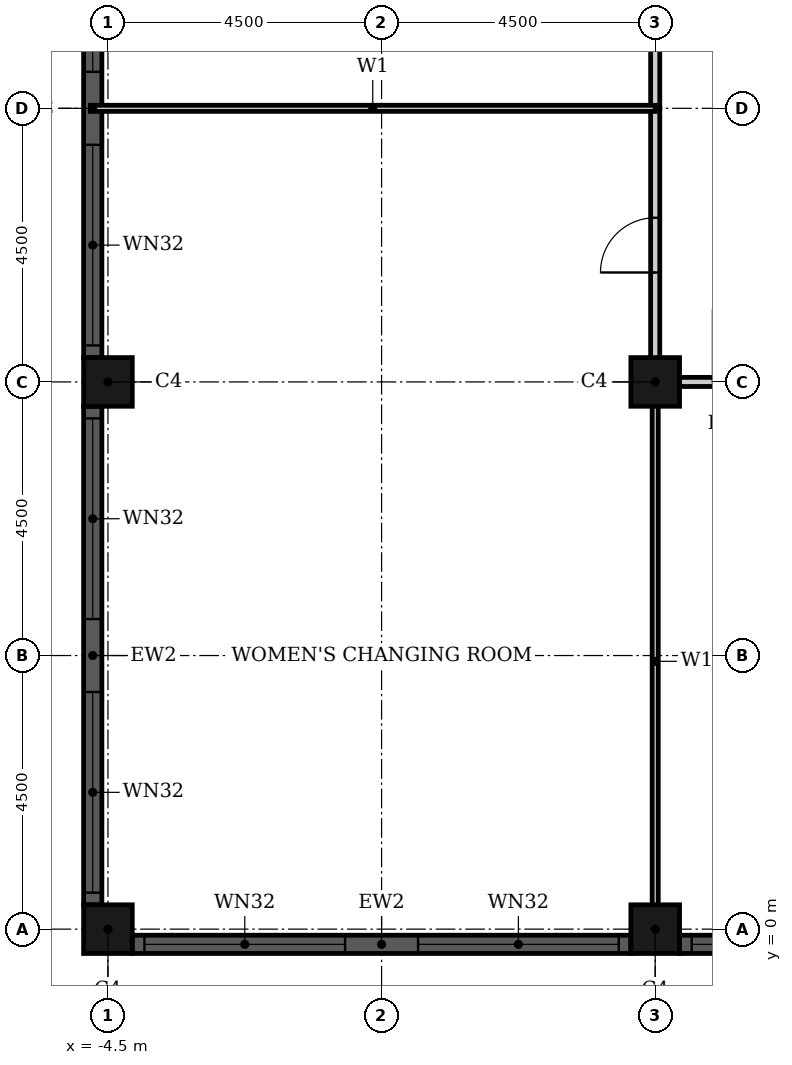
"""IFC4 building model, lengths in metres.
Left out: names, types, materials, properties, quantities, classifications, styles, units other than length and angle.
Written with IfcOpenShell. Run it as: python <this file> out.ifc"""

import sys

from ifc_helpers import new_model, si_unit, direction, frame, frame_2d, origin, origin_2d, place, context, subcontext, project, spatial, rectangle, hollow_rectangle, extrude, element, fill, save


model = new_model("IFC4")
c1 = context("Model", 3, precision=1e-05, world=origin(), true_north=direction((0.0, 1.0)))
c2 = subcontext(c1, "Body", "Model", "MODEL_VIEW")
j1 = project(units=[si_unit("LENGTHUNIT", "METRE"), si_unit("PLANEANGLEUNIT", "RADIAN")], contexts=[c1])
p1 = place(None, origin())
s1 = spatial("IfcSite", under=j1, at=p1, CompositionType="ELEMENT")
p2 = place(p1, origin())
s2 = spatial("IfcBuilding", under=s1, at=p2, CompositionType="ELEMENT")
p3 = place(p2, frame((0.0, 0.0, 24.0)))
s3 = spatial("IfcBuildingStorey", under=s2, at=p3, CompositionType="ELEMENT", Elevation=24.0)
for number, where, z_axis, x_axis in (
    (1, (-4.5, 0.0, 0.0), (0.0, 0.0, 1.0), (1.0, 0.0, 0.0)),
    (2, (-4.5, 9.0, 0.0), (0.0, 0.0, 1.0), (1.0, 0.0, 0.0)),
    (3, (4.5, 0.0, 0.0), (0.0, 0.0, 1.0), (1.0, 0.0, 0.0)),
    (4, (4.5, 9.0, 0.0), (0.0, 0.0, 1.0), (1.0, 0.0, 0.0)),
):
    element("IfcColumn", number, at=place(p3, frame(where, z_axis=z_axis, x_axis=x_axis)), inside=s3, PredefinedType="COLUMN", context=c2, shape_type="SweptSolid", body=[
        extrude(hollow_rectangle(XDim=0.8, YDim=0.8, WallThickness=0.025, at=origin_2d()), origin(), (0.0, 0.0, 1.0), 4.8),
    ])
p4 = place(p3, frame((-4.75, 17.6, 0.0), z_axis=(0.0, 0.0, 1.0), x_axis=(0.0, -1.0, 0.0)))
e5 = element("IfcWall", 5, at=p4, inside=s3, PredefinedType="SOLIDWALL", context=c2, shape_type="SweptSolid", body=[
    extrude(rectangle(XDim=8.2, YDim=0.3, at=frame_2d((4.1, 0.0))), origin(), (0.0, 0.0, 1.0), 4.8),
])
p5 = place(p4, frame((0.2, 0.0, 0.9)))
e6 = element("IfcOpeningElement", 6, at=p5, cuts=e5, PredefinedType="OPENING", context=c2, shape_type="SweptSolid", body=[
    extrude(rectangle(XDim=3.3, YDim=2.9, at=frame_2d((1.65, 1.45))), frame((0.0, 0.16, 0.0), z_axis=(0.0, -1.0, 0.0), x_axis=(1.0, 0.0, 0.0)), (0.0, 0.0, 1.0), 0.32),
])
p6 = place(p4, frame((4.7, 0.0, 0.9)))
e7 = element("IfcOpeningElement", 7, at=p6, cuts=e5, PredefinedType="OPENING", context=c2, shape_type="SweptSolid", body=[
    extrude(rectangle(XDim=3.3, YDim=2.9, at=frame_2d((1.65, 1.45))), frame((0.0, 0.16, 0.0), z_axis=(0.0, -1.0, 0.0), x_axis=(1.0, 0.0, 0.0)), (0.0, 0.0, 1.0), 0.32),
])
p7 = place(p3, frame((-4.75, 8.6, 0.0), z_axis=(0.0, 0.0, 1.0), x_axis=(0.0, -1.0, 0.0)))
e8 = element("IfcWall", 8, at=p7, inside=s3, PredefinedType="SOLIDWALL", context=c2, shape_type="SweptSolid", body=[
    extrude(rectangle(XDim=8.2, YDim=0.3, at=frame_2d((4.1, 0.0))), origin(), (0.0, 0.0, 1.0), 4.8),
])
p8 = place(p7, frame((0.2, 0.0, 0.9)))
e9 = element("IfcOpeningElement", 9, at=p8, cuts=e8, PredefinedType="OPENING", context=c2, shape_type="SweptSolid", body=[
    extrude(rectangle(XDim=3.3, YDim=2.9, at=frame_2d((1.65, 1.45))), frame((0.0, 0.16, 0.0), z_axis=(0.0, -1.0, 0.0), x_axis=(1.0, 0.0, 0.0)), (0.0, 0.0, 1.0), 0.32),
])
p9 = place(p7, frame((4.7, 0.0, 0.9)))
e10 = element("IfcOpeningElement", 10, at=p9, cuts=e8, PredefinedType="OPENING", context=c2, shape_type="SweptSolid", body=[
    extrude(rectangle(XDim=3.3, YDim=2.9, at=frame_2d((1.65, 1.45))), frame((0.0, 0.16, 0.0), z_axis=(0.0, -1.0, 0.0), x_axis=(1.0, 0.0, 0.0)), (0.0, 0.0, 1.0), 0.32),
])
p10 = place(p3, frame((-4.1, -0.25, 0.0), z_axis=(0.0, 0.0, 1.0), x_axis=(1.0, 0.0, 0.0)))
e11 = element("IfcWall", 11, at=p10, inside=s3, PredefinedType="SOLIDWALL", context=c2, shape_type="SweptSolid", body=[
    extrude(rectangle(XDim=8.2, YDim=0.3, at=frame_2d((4.1, 0.0))), origin(), (0.0, 0.0, 1.0), 4.8),
])
p11 = place(p10, frame((0.2, 0.0, 0.9)))
e12 = element("IfcOpeningElement", 12, at=p11, cuts=e11, PredefinedType="OPENING", context=c2, shape_type="SweptSolid", body=[
    extrude(rectangle(XDim=3.3, YDim=2.9, at=frame_2d((1.65, 1.45))), frame((0.0, 0.16, 0.0), z_axis=(0.0, -1.0, 0.0), x_axis=(1.0, 0.0, 0.0)), (0.0, 0.0, 1.0), 0.32),
])
p12 = place(p10, frame((4.7, 0.0, 0.9)))
e13 = element("IfcOpeningElement", 13, at=p12, cuts=e11, PredefinedType="OPENING", context=c2, shape_type="SweptSolid", body=[
    extrude(rectangle(XDim=3.3, YDim=2.9, at=frame_2d((1.65, 1.45))), frame((0.0, 0.16, 0.0), z_axis=(0.0, -1.0, 0.0), x_axis=(1.0, 0.0, 0.0)), (0.0, 0.0, 1.0), 0.32),
])
p13 = place(p3, frame((4.9, -0.25, 0.0), z_axis=(0.0, 0.0, 1.0), x_axis=(1.0, 0.0, 0.0)))
e14 = element("IfcWall", 14, at=p13, inside=s3, PredefinedType="SOLIDWALL", context=c2, shape_type="SweptSolid", body=[
    extrude(rectangle(XDim=8.2, YDim=0.3, at=frame_2d((4.1, 0.0))), origin(), (0.0, 0.0, 1.0), 4.8),
])
p14 = place(p13, frame((0.2, 0.0, 0.9)))
e15 = element("IfcOpeningElement", 15, at=p14, cuts=e14, PredefinedType="OPENING", context=c2, shape_type="SweptSolid", body=[
    extrude(rectangle(XDim=3.3, YDim=2.9, at=frame_2d((1.65, 1.45))), frame((0.0, 0.16, 0.0), z_axis=(0.0, -1.0, 0.0), x_axis=(1.0, 0.0, 0.0)), (0.0, 0.0, 1.0), 0.32),
])
p15 = place(p13, frame((4.7, 0.0, 0.9)))
e16 = element("IfcOpeningElement", 16, at=p15, cuts=e14, PredefinedType="OPENING", context=c2, shape_type="SweptSolid", body=[
    extrude(rectangle(XDim=3.3, YDim=2.9, at=frame_2d((1.65, 1.45))), frame((0.0, 0.16, 0.0), z_axis=(0.0, -1.0, 0.0), x_axis=(1.0, 0.0, 0.0)), (0.0, 0.0, 1.0), 0.32),
])
p16 = place(p3, frame((4.5, 9.0, 0.0), z_axis=(0.0, 0.0, 1.0), x_axis=(1.0, 0.0, 0.0)))
e17 = element("IfcWall", 17, at=p16, inside=s3, PredefinedType="PARTITIONING", context=c2, shape_type="SweptSolid", body=[
    extrude(rectangle(XDim=3.1, YDim=0.15, at=frame_2d((1.55, 0.0))), origin(), (0.0, 0.0, 1.0), 4.45),
])
p17 = place(p16, frame((0.95, 0.0, 0.0)))
e18 = element("IfcOpeningElement", 18, at=p17, cuts=e17, PredefinedType="OPENING", context=c2, shape_type="SweptSolid", body=[
    extrude(rectangle(XDim=1.2, YDim=2.4, at=frame_2d((0.6, 1.2))), frame((0.0, 0.085, 0.0), z_axis=(0.0, -1.0, 0.0), x_axis=(1.0, 0.0, 0.0)), (0.0, 0.0, 1.0), 0.17),
])
p18 = place(p3, frame((4.5, 9.0, 0.0), z_axis=(0.0, 0.0, 1.0), x_axis=(0.0, 1.0, 0.0)))
e19 = element("IfcWall", 19, at=p18, inside=s3, PredefinedType="PARTITIONING", context=c2, shape_type="SweptSolid", body=[
    extrude(rectangle(XDim=4.5, YDim=0.15, at=frame_2d((2.25, 0.0))), origin(), (0.0, 0.0, 1.0), 4.45),
])
p19 = place(p18, frame((1.8, 0.0, 0.0)))
e20 = element("IfcOpeningElement", 20, at=p19, cuts=e19, PredefinedType="OPENING", context=c2, shape_type="SweptSolid", body=[
    extrude(rectangle(XDim=0.9, YDim=2.1, at=frame_2d((0.45, 1.05))), frame((0.0, 0.085, 0.0), z_axis=(0.0, -1.0, 0.0), x_axis=(1.0, 0.0, 0.0)), (0.0, 0.0, 1.0), 0.17),
])
p20 = place(p3, frame((4.5, 13.5, 0.0), z_axis=(0.0, 0.0, 1.0), x_axis=(0.0, 1.0, 0.0)))
e21 = element("IfcWall", 21, at=p20, inside=s3, PredefinedType="PARTITIONING", context=c2, shape_type="SweptSolid", body=[
    extrude(rectangle(XDim=10.0, YDim=0.15, at=frame_2d((5.0, 0.0))), origin(), (0.0, 0.0, 1.0), 4.45),
])
p21 = place(p20, frame((2.75, 0.0, 0.0)))
e22 = element("IfcOpeningElement", 22, at=p21, cuts=e21, PredefinedType="OPENING", context=c2, shape_type="SweptSolid", body=[
    extrude(rectangle(XDim=0.9, YDim=2.1, at=frame_2d((0.45, 1.05))), frame((0.0, 0.085, 0.0), z_axis=(0.0, -1.0, 0.0), x_axis=(1.0, 0.0, 0.0)), (0.0, 0.0, 1.0), 0.17),
])
p22 = place(p3, frame((-4.79, 13.5, 0.0), z_axis=(0.0, 0.0, 1.0), x_axis=(1.0, 0.0, 0.0)))
e23 = element("IfcWall", 23, at=p22, inside=s3, PredefinedType="PARTITIONING", context=c2, shape_type="SweptSolid", body=[
    extrude(rectangle(XDim=9.29, YDim=0.1, at=frame_2d((4.645, 0.0))), origin(), (0.0, 0.0, 1.0), 4.45),
])
p23 = place(p3, frame((4.5, -0.19, 0.0), z_axis=(0.0, 0.0, 1.0), x_axis=(0.0, 1.0, 0.0)))
e24 = element("IfcWall", 24, at=p23, inside=s3, PredefinedType="PARTITIONING", context=c2, shape_type="SweptSolid", body=[
    extrude(rectangle(XDim=9.19, YDim=0.1, at=frame_2d((4.595, 0.0))), origin(), (0.0, 0.0, 1.0), 4.45),
])
p24 = place(p5, origin())
e25 = element("IfcWindow", 25, at=p24, inside=s3, PartitioningType="SINGLE_PANEL", PredefinedType="WINDOW", context=c2, shape_type="SweptSolid", body=[
    extrude(rectangle(XDim=3.3, YDim=2.9, at=frame_2d((1.65, 1.45))), frame((0.0, 0.03, 0.0), z_axis=(0.0, -1.0, 0.0), x_axis=(1.0, 0.0, 0.0)), (0.0, 0.0, 1.0), 0.06),
])
fill(e6, e25)
p25 = place(p6, origin())
e26 = element("IfcWindow", 26, at=p25, inside=s3, PartitioningType="SINGLE_PANEL", PredefinedType="WINDOW", context=c2, shape_type="SweptSolid", body=[
    extrude(rectangle(XDim=3.3, YDim=2.9, at=frame_2d((1.65, 1.45))), frame((0.0, 0.03, 0.0), z_axis=(0.0, -1.0, 0.0), x_axis=(1.0, 0.0, 0.0)), (0.0, 0.0, 1.0), 0.06),
])
fill(e7, e26)
p26 = place(p8, origin())
e27 = element("IfcWindow", 27, at=p26, inside=s3, PartitioningType="SINGLE_PANEL", PredefinedType="WINDOW", context=c2, shape_type="SweptSolid", body=[
    extrude(rectangle(XDim=3.3, YDim=2.9, at=frame_2d((1.65, 1.45))), frame((0.0, 0.03, 0.0), z_axis=(0.0, -1.0, 0.0), x_axis=(1.0, 0.0, 0.0)), (0.0, 0.0, 1.0), 0.06),
])
fill(e9, e27)
p27 = place(p9, origin())
e28 = element("IfcWindow", 28, at=p27, inside=s3, PartitioningType="SINGLE_PANEL", PredefinedType="WINDOW", context=c2, shape_type="SweptSolid", body=[
    extrude(rectangle(XDim=3.3, YDim=2.9, at=frame_2d((1.65, 1.45))), frame((0.0, 0.03, 0.0), z_axis=(0.0, -1.0, 0.0), x_axis=(1.0, 0.0, 0.0)), (0.0, 0.0, 1.0), 0.06),
])
fill(e10, e28)
p28 = place(p11, origin())
e29 = element("IfcWindow", 29, at=p28, inside=s3, PartitioningType="SINGLE_PANEL", PredefinedType="WINDOW", context=c2, shape_type="SweptSolid", body=[
    extrude(rectangle(XDim=3.3, YDim=2.9, at=frame_2d((1.65, 1.45))), frame((0.0, 0.03, 0.0), z_axis=(0.0, -1.0, 0.0), x_axis=(1.0, 0.0, 0.0)), (0.0, 0.0, 1.0), 0.06),
])
fill(e12, e29)
p29 = place(p12, origin())
e30 = element("IfcWindow", 30, at=p29, inside=s3, PartitioningType="SINGLE_PANEL", PredefinedType="WINDOW", context=c2, shape_type="SweptSolid", body=[
    extrude(rectangle(XDim=3.3, YDim=2.9, at=frame_2d((1.65, 1.45))), frame((0.0, 0.03, 0.0), z_axis=(0.0, -1.0, 0.0), x_axis=(1.0, 0.0, 0.0)), (0.0, 0.0, 1.0), 0.06),
])
fill(e13, e30)
p30 = place(p14, origin())
e31 = element("IfcWindow", 31, at=p30, inside=s3, PartitioningType="SINGLE_PANEL", PredefinedType="WINDOW", context=c2, shape_type="SweptSolid", body=[
    extrude(rectangle(XDim=3.3, YDim=2.9, at=frame_2d((1.65, 1.45))), frame((0.0, 0.03, 0.0), z_axis=(0.0, -1.0, 0.0), x_axis=(1.0, 0.0, 0.0)), (0.0, 0.0, 1.0), 0.06),
])
fill(e15, e31)
p31 = place(p19, origin())
e32 = element("IfcDoor", 32, at=p31, inside=s3, OperationType="SINGLE_SWING_RIGHT", PredefinedType="DOOR", context=c2, shape_type="SweptSolid", body=[
    extrude(rectangle(XDim=0.9, YDim=2.1, at=frame_2d((0.45, 1.05))), frame((0.0, 0.025, 0.0), z_axis=(0.0, -1.0, 0.0), x_axis=(1.0, 0.0, 0.0)), (0.0, 0.0, 1.0), 0.05),
])
fill(e20, e32)
save(model, sys.argv[1])
